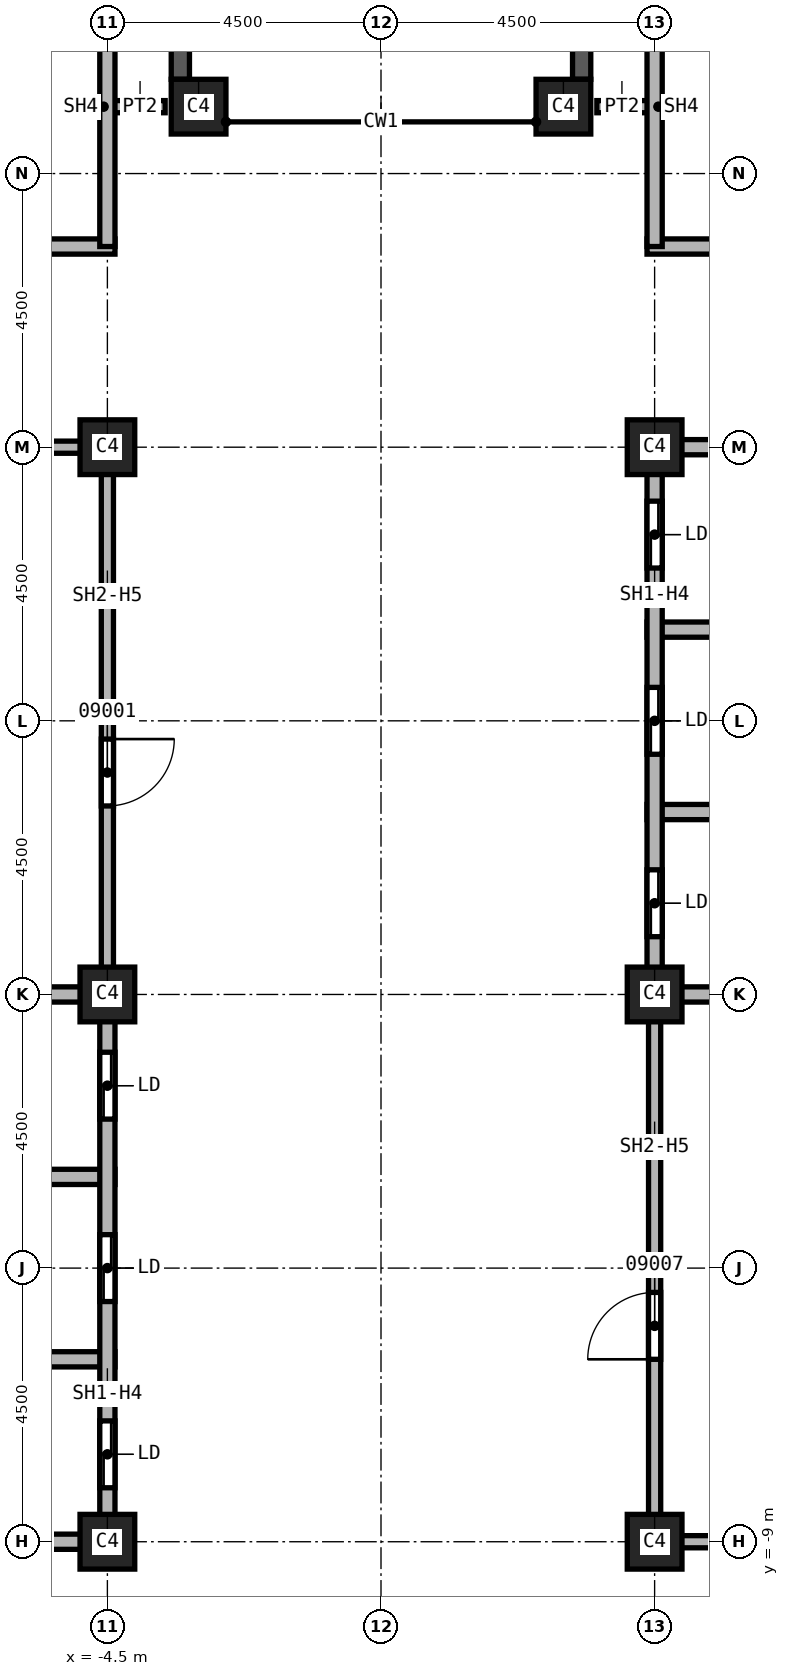
"""IFC4 building model, lengths in metres.
Left out: names, types, materials, properties, quantities, classifications, styles, units other than length and angle.
Written with IfcOpenShell. Run it as: python <this file> out.ifc"""

import sys

from ifc_helpers import new_model, si_unit, direction, frame, frame_2d, origin, origin_2d, place, context, subcontext, project, spatial, rectangle, extrude, element, fill, save


model = new_model("IFC4")
c1 = context("Model", 3, precision=1e-05, world=origin(), true_north=direction((0.0, 1.0)))
c2 = subcontext(c1, "Body", "Model", "MODEL_VIEW")
j1 = project(units=[si_unit("LENGTHUNIT", "METRE"), si_unit("PLANEANGLEUNIT", "RADIAN")], contexts=[c1])
p1 = place(None, origin())
s1 = spatial("IfcSite", under=j1, at=p1, CompositionType="ELEMENT")
p2 = place(p1, origin())
s2 = spatial("IfcBuilding", under=s1, at=p2, CompositionType="ELEMENT")
p3 = place(p2, frame((0.0, 0.0, 162.0)))
s3 = spatial("IfcBuildingStorey", under=s2, at=p3, CompositionType="ELEMENT", Elevation=162.0)
for number, where, z_axis, x_axis in (
    (1, (4.5, 0.0, 0.0), (0.0, 0.0, 1.0), (1.0, 0.0, 0.0)),
    (2, (4.5, 9.0, 0.0), (0.0, 0.0, 1.0), (1.0, 0.0, 0.0)),
    (3, (4.5, -9.0, 0.0), (0.0, 0.0, 1.0), (1.0, 0.0, 0.0)),
    (4, (-4.5, 0.0, 0.0), (0.0, 0.0, 1.0), (1.0, 0.0, 0.0)),
    (5, (-4.5, 9.0, 0.0), (0.0, 0.0, 1.0), (1.0, 0.0, 0.0)),
    (6, (-4.5, -9.0, 0.0), (0.0, 0.0, 1.0), (1.0, 0.0, 0.0)),
    (7, (3.0, 14.6, 0.0), (0.0, 0.0, 1.0), (1.0, 0.0, 0.0)),
    (8, (-3.0, 14.6, 0.0), (0.0, 0.0, 1.0), (1.0, 0.0, 0.0)),
):
    element("IfcColumn", number, at=place(p3, frame(where, z_axis=z_axis, x_axis=x_axis)), inside=s3, PredefinedType="COLUMN", context=c2, shape_type="SweptSolid", body=[
        extrude(rectangle(XDim=0.9, YDim=0.9, at=origin_2d()), origin(), (0.0, 0.0, 1.0), 3.7),
    ])
p4 = place(p3, frame((3.3, 23.05, 0.0), z_axis=(0.0, 0.0, 1.0), x_axis=(0.0, -1.0, 0.0)))
e9 = element("IfcWall", 9, at=p4, inside=s3, PredefinedType="SOLIDWALL", context=c2, shape_type="SweptSolid", body=[
    extrude(rectangle(XDim=8.0, YDim=0.3, at=frame_2d((4.0, 0.0))), origin(), (0.0, 0.0, 1.0), 3.1),
])
p5 = place(p4, frame((0.8, 0.0, 0.8)))
e10 = element("IfcOpeningElement", 10, at=p5, cuts=e9, PredefinedType="OPENING", context=c2, shape_type="SweptSolid", body=[
    extrude(rectangle(XDim=2.4, YDim=1.95, at=frame_2d((1.2, 0.975))), frame((0.0, 0.15, 0.0), z_axis=(0.0, -1.0, 0.0), x_axis=(1.0, 0.0, 0.0)), (0.0, 0.0, 1.0), 0.3),
])
p6 = place(p4, frame((4.8, 0.0, 0.8)))
e11 = element("IfcOpeningElement", 11, at=p6, cuts=e9, PredefinedType="OPENING", context=c2, shape_type="SweptSolid", body=[
    extrude(rectangle(XDim=2.4, YDim=1.95, at=frame_2d((1.2, 0.975))), frame((0.0, 0.15, 0.0), z_axis=(0.0, -1.0, 0.0), x_axis=(1.0, 0.0, 0.0)), (0.0, 0.0, 1.0), 0.3),
])
p7 = place(p3, frame((-3.3, 15.05, 0.0), z_axis=(0.0, 0.0, 1.0), x_axis=(0.0, 1.0, 0.0)))
e12 = element("IfcWall", 12, at=p7, inside=s3, PredefinedType="SOLIDWALL", context=c2, shape_type="SweptSolid", body=[
    extrude(rectangle(XDim=8.0, YDim=0.3, at=frame_2d((4.0, 0.0))), origin(), (0.0, 0.0, 1.0), 3.1),
])
p8 = place(p7, frame((0.8, 0.0, 0.8)))
e13 = element("IfcOpeningElement", 13, at=p8, cuts=e12, PredefinedType="OPENING", context=c2, shape_type="SweptSolid", body=[
    extrude(rectangle(XDim=2.4, YDim=1.95, at=frame_2d((1.2, 0.975))), frame((0.0, 0.15, 0.0), z_axis=(0.0, -1.0, 0.0), x_axis=(1.0, 0.0, 0.0)), (0.0, 0.0, 1.0), 0.3),
])
p9 = place(p7, frame((4.8, 0.0, 0.8)))
e14 = element("IfcOpeningElement", 14, at=p9, cuts=e12, PredefinedType="OPENING", context=c2, shape_type="SweptSolid", body=[
    extrude(rectangle(XDim=2.4, YDim=1.95, at=frame_2d((1.2, 0.975))), frame((0.0, 0.15, 0.0), z_axis=(0.0, -1.0, 0.0), x_axis=(1.0, 0.0, 0.0)), (0.0, 0.0, 1.0), 0.3),
])
for number, where, z_axis, x_axis in (
    (15, (-4.5, 14.6, 0.0), (0.0, 0.0, 1.0), (1.0, 0.0, 0.0)),
    (16, (3.55, 14.6, 0.0), (0.0, 0.0, 1.0), (1.0, 0.0, 0.0)),
):
    element("IfcWall", number, at=place(p3, frame(where, z_axis=z_axis, x_axis=x_axis)), inside=s3, PredefinedType="PARTITIONING", context=c2, shape_type="SweptSolid", body=[
        extrude(rectangle(XDim=0.95, YDim=0.2, at=frame_2d((0.475, 0.0))), origin(), (0.0, 0.0, 1.0), 3.7),
    ])
p10 = place(p3, frame((-7.5, 9.0, 0.0), z_axis=(0.0, 0.0, 1.0), x_axis=(1.0, 0.0, 0.0)))
e17 = element("IfcWall", 17, at=p10, inside=s3, PredefinedType="SOLIDWALL", context=c2, shape_type="SweptSolid", body=[
    extrude(rectangle(XDim=3.0, YDim=0.2, at=frame_2d((1.5, 0.0))), origin(), (0.0, 0.0, 1.0), 2.938),
])
p11 = place(p3, frame((-4.5, 9.1, 0.0), z_axis=(0.0, 0.0, 1.0), x_axis=(0.0, -1.0, 0.0)))
e18 = element("IfcWall", 18, at=p11, inside=s3, PredefinedType="SOLIDWALL", context=c2, shape_type="SweptSolid", body=[
    extrude(rectangle(XDim=9.1, YDim=0.2, at=frame_2d((4.55, 0.0))), origin(), (0.0, 0.0, 1.0), 2.938),
])
p12 = place(p11, frame((4.9, 0.0, 0.0)))
e19 = element("IfcOpeningElement", 19, at=p12, cuts=e18, PredefinedType="OPENING", context=c2, shape_type="SweptSolid", body=[
    extrude(rectangle(XDim=1.1, YDim=2.1, at=frame_2d((0.55, 1.05))), frame((0.0, 0.1, 0.0), z_axis=(0.0, -1.0, 0.0), x_axis=(1.0, 0.0, 0.0)), (0.0, 0.0, 1.0), 0.2),
])
p13 = place(p3, frame((4.5, -9.1, 0.0), z_axis=(0.0, 0.0, 1.0), x_axis=(0.0, 1.0, 0.0)))
e20 = element("IfcWall", 20, at=p13, inside=s3, PredefinedType="SOLIDWALL", context=c2, shape_type="SweptSolid", body=[
    extrude(rectangle(XDim=9.1, YDim=0.2, at=frame_2d((4.55, 0.0))), origin(), (0.0, 0.0, 1.0), 2.938),
])
p14 = place(p13, frame((3.1, 0.0, 0.0)))
e21 = element("IfcOpeningElement", 21, at=p14, cuts=e20, PredefinedType="OPENING", context=c2, shape_type="SweptSolid", body=[
    extrude(rectangle(XDim=1.1, YDim=2.1, at=frame_2d((0.55, 1.05))), frame((0.0, 0.1, 0.0), z_axis=(0.0, -1.0, 0.0), x_axis=(1.0, 0.0, 0.0)), (0.0, 0.0, 1.0), 0.2),
])
p15 = place(p3, frame((7.5, -9.0, 0.0), z_axis=(0.0, 0.0, 1.0), x_axis=(-1.0, 0.0, 0.0)))
e22 = element("IfcWall", 22, at=p15, inside=s3, PredefinedType="SOLIDWALL", context=c2, shape_type="SweptSolid", body=[
    extrude(rectangle(XDim=3.0, YDim=0.2, at=frame_2d((1.5, 0.0))), origin(), (0.0, 0.0, 1.0), 2.938),
])
p16 = place(p3, frame((-13.625, -3.0, 0.0), z_axis=(0.0, 0.0, 1.0), x_axis=(1.0, 0.0, 0.0)))
e23 = element("IfcWall", 23, at=p16, inside=s3, PredefinedType="SOLIDWALL", context=c2, shape_type="SweptSolid", body=[
    extrude(rectangle(XDim=9.25, YDim=0.25, at=frame_2d((4.625, 0.0))), origin(), (0.0, 0.0, 1.0), 3.7),
])
p17 = place(p16, frame((3.25, 0.0, 0.0)))
e24 = element("IfcOpeningElement", 24, at=p17, cuts=e23, PredefinedType="OPENING", context=c2, shape_type="SweptSolid", body=[
    extrude(rectangle(XDim=1.1, YDim=2.1, at=frame_2d((0.55, 1.05))), frame((0.0, 0.125, 0.0), z_axis=(0.0, -1.0, 0.0), x_axis=(1.0, 0.0, 0.0)), (0.0, 0.0, 1.0), 0.25),
])
for number, where, z_axis, x_axis in (
    (25, (-7.625, -6.0, 0.0), (0.0, 0.0, 1.0), (1.0, 0.0, 0.0)),
    (26, (-7.625, 0.0, 0.0), (0.0, 0.0, 1.0), (1.0, 0.0, 0.0)),
):
    element("IfcWall", number, at=place(p3, frame(where, z_axis=z_axis, x_axis=x_axis)), inside=s3, PredefinedType="SOLIDWALL", context=c2, shape_type="SweptSolid", body=[
        extrude(rectangle(XDim=3.25, YDim=0.25, at=frame_2d((1.625, 0.0))), origin(), (0.0, 0.0, 1.0), 3.7),
    ])
p18 = place(p3, frame((-4.5, -9.0, 0.0), z_axis=(0.0, 0.0, 1.0), x_axis=(-1.0, 0.0, 0.0)))
e27 = element("IfcWall", 27, at=p18, inside=s3, PredefinedType="SOLIDWALL", context=c2, shape_type="SweptSolid", body=[
    extrude(rectangle(XDim=3.0, YDim=0.25, at=frame_2d((1.5, 0.0))), origin(), (0.0, 0.0, 1.0), 2.938),
])
p19 = place(p3, frame((-4.5, 0.0, 0.0), z_axis=(0.0, 0.0, 1.0), x_axis=(0.0, -1.0, 0.0)))
e28 = element("IfcWall", 28, at=p19, inside=s3, PredefinedType="SOLIDWALL", context=c2, shape_type="SweptSolid", body=[
    extrude(rectangle(XDim=9.125, YDim=0.25, at=frame_2d((4.562, 0.0))), origin(), (0.0, 0.0, 1.0), 2.938),
])
p20 = place(p19, frame((7.012, 0.0, 0.0)))
e29 = element("IfcOpeningElement", 29, at=p20, cuts=e28, PredefinedType="OPENING", context=c2, shape_type="SweptSolid", body=[
    extrude(rectangle(XDim=1.1, YDim=2.1, at=frame_2d((0.55, 1.05))), frame((0.0, 0.125, 0.0), z_axis=(0.0, -1.0, 0.0), x_axis=(1.0, 0.0, 0.0)), (0.0, 0.0, 1.0), 0.25),
])
p21 = place(p19, frame((3.95, 0.0, 0.0)))
e30 = element("IfcOpeningElement", 30, at=p21, cuts=e28, PredefinedType="OPENING", context=c2, shape_type="SweptSolid", body=[
    extrude(rectangle(XDim=1.1, YDim=2.1, at=frame_2d((0.55, 1.05))), frame((0.0, 0.125, 0.0), z_axis=(0.0, -1.0, 0.0), x_axis=(1.0, 0.0, 0.0)), (0.0, 0.0, 1.0), 0.25),
])
p22 = place(p19, frame((0.95, 0.0, 0.0)))
e31 = element("IfcOpeningElement", 31, at=p22, cuts=e28, PredefinedType="OPENING", context=c2, shape_type="SweptSolid", body=[
    extrude(rectangle(XDim=1.1, YDim=2.1, at=frame_2d((0.55, 1.05))), frame((0.0, 0.125, 0.0), z_axis=(0.0, -1.0, 0.0), x_axis=(1.0, 0.0, 0.0)), (0.0, 0.0, 1.0), 0.25),
])
p23 = place(p3, frame((4.375, 0.0, 0.0), z_axis=(0.0, 0.0, 1.0), x_axis=(1.0, 0.0, 0.0)))
e32 = element("IfcWall", 32, at=p23, inside=s3, PredefinedType="SOLIDWALL", context=c2, shape_type="SweptSolid", body=[
    extrude(rectangle(XDim=3.25, YDim=0.25, at=frame_2d((1.625, 0.0))), origin(), (0.0, 0.0, 1.0), 3.7),
])
p24 = place(p3, frame((4.375, 3.0, 0.0), z_axis=(0.0, 0.0, 1.0), x_axis=(1.0, 0.0, 0.0)))
e33 = element("IfcWall", 33, at=p24, inside=s3, PredefinedType="SOLIDWALL", context=c2, shape_type="SweptSolid", body=[
    extrude(rectangle(XDim=9.25, YDim=0.25, at=frame_2d((4.625, 0.0))), origin(), (0.0, 0.0, 1.0), 3.7),
])
p25 = place(p24, frame((4.875, 0.0, 0.0)))
e34 = element("IfcOpeningElement", 34, at=p25, cuts=e33, PredefinedType="OPENING", context=c2, shape_type="SweptSolid", body=[
    extrude(rectangle(XDim=1.1, YDim=2.1, at=frame_2d((0.55, 1.05))), frame((0.0, 0.125, 0.0), z_axis=(0.0, -1.0, 0.0), x_axis=(1.0, 0.0, 0.0)), (0.0, 0.0, 1.0), 0.25),
])
p26 = place(p3, frame((4.375, 6.0, 0.0), z_axis=(0.0, 0.0, 1.0), x_axis=(1.0, 0.0, 0.0)))
e35 = element("IfcWall", 35, at=p26, inside=s3, PredefinedType="SOLIDWALL", context=c2, shape_type="SweptSolid", body=[
    extrude(rectangle(XDim=3.25, YDim=0.25, at=frame_2d((1.625, 0.0))), origin(), (0.0, 0.0, 1.0), 3.7),
])
p27 = place(p3, frame((4.5, 0.0, 0.0), z_axis=(0.0, 0.0, 1.0), x_axis=(0.0, 1.0, 0.0)))
e36 = element("IfcWall", 36, at=p27, inside=s3, PredefinedType="SOLIDWALL", context=c2, shape_type="SweptSolid", body=[
    extrude(rectangle(XDim=9.125, YDim=0.25, at=frame_2d((4.562, 0.0))), origin(), (0.0, 0.0, 1.0), 2.938),
])
p28 = place(p27, frame((0.95, 0.0, 0.0)))
e37 = element("IfcOpeningElement", 37, at=p28, cuts=e36, PredefinedType="OPENING", context=c2, shape_type="SweptSolid", body=[
    extrude(rectangle(XDim=1.1, YDim=2.1, at=frame_2d((0.55, 1.05))), frame((0.0, 0.125, 0.0), z_axis=(0.0, -1.0, 0.0), x_axis=(1.0, 0.0, 0.0)), (0.0, 0.0, 1.0), 0.25),
])
p29 = place(p27, frame((3.95, 0.0, 0.0)))
e38 = element("IfcOpeningElement", 38, at=p29, cuts=e36, PredefinedType="OPENING", context=c2, shape_type="SweptSolid", body=[
    extrude(rectangle(XDim=1.1, YDim=2.1, at=frame_2d((0.55, 1.05))), frame((0.0, 0.125, 0.0), z_axis=(0.0, -1.0, 0.0), x_axis=(1.0, 0.0, 0.0)), (0.0, 0.0, 1.0), 0.25),
])
p30 = place(p27, frame((7.012, 0.0, 0.0)))
e39 = element("IfcOpeningElement", 39, at=p30, cuts=e36, PredefinedType="OPENING", context=c2, shape_type="SweptSolid", body=[
    extrude(rectangle(XDim=1.1, YDim=2.1, at=frame_2d((0.55, 1.05))), frame((0.0, 0.125, 0.0), z_axis=(0.0, -1.0, 0.0), x_axis=(1.0, 0.0, 0.0)), (0.0, 0.0, 1.0), 0.25),
])
p31 = place(p3, frame((4.5, 9.0, 0.0), z_axis=(0.0, 0.0, 1.0), x_axis=(1.0, 0.0, 0.0)))
e40 = element("IfcWall", 40, at=p31, inside=s3, PredefinedType="SOLIDWALL", context=c2, shape_type="SweptSolid", body=[
    extrude(rectangle(XDim=3.0, YDim=0.25, at=frame_2d((1.5, 0.0))), origin(), (0.0, 0.0, 1.0), 2.938),
])
p32 = place(p3, frame((-13.5, 12.3, 0.0), z_axis=(0.0, 0.0, 1.0), x_axis=(1.0, 0.0, 0.0)))
e41 = element("IfcWall", 41, at=p32, inside=s3, PredefinedType="SOLIDWALL", context=c2, shape_type="SweptSolid", body=[
    extrude(rectangle(XDim=9.125, YDim=0.25, at=frame_2d((4.562, 0.0))), origin(), (0.0, 0.0, 1.0), 3.7),
])
p33 = place(p32, frame((0.6, 0.0, 0.0)))
e42 = element("IfcOpeningElement", 42, at=p33, cuts=e41, PredefinedType="OPENING", context=c2, shape_type="SweptSolid", body=[
    extrude(rectangle(XDim=1.2, YDim=2.1, at=frame_2d((0.6, 1.05))), frame((0.0, 0.125, 0.0), z_axis=(0.0, -1.0, 0.0), x_axis=(1.0, 0.0, 0.0)), (0.0, 0.0, 1.0), 0.25),
])
p34 = place(p3, frame((-4.5, 16.8, 0.0), z_axis=(0.0, 0.0, 1.0), x_axis=(0.0, -1.0, 0.0)))
e43 = element("IfcWall", 43, at=p34, inside=s3, PredefinedType="SOLIDWALL", context=c2, shape_type="SweptSolid", body=[
    extrude(rectangle(XDim=4.5, YDim=0.25, at=frame_2d((2.25, 0.0))), origin(), (0.0, 0.0, 1.0), 3.7),
])
p35 = place(p3, frame((4.375, 12.3, 0.0), z_axis=(0.0, 0.0, 1.0), x_axis=(1.0, 0.0, 0.0)))
e44 = element("IfcWall", 44, at=p35, inside=s3, PredefinedType="SOLIDWALL", context=c2, shape_type="SweptSolid", body=[
    extrude(rectangle(XDim=9.125, YDim=0.25, at=frame_2d((4.562, 0.0))), origin(), (0.0, 0.0, 1.0), 3.7),
])
p36 = place(p35, frame((7.2, 0.0, 0.0)))
e45 = element("IfcOpeningElement", 45, at=p36, cuts=e44, PredefinedType="OPENING", context=c2, shape_type="SweptSolid", body=[
    extrude(rectangle(XDim=1.2, YDim=2.1, at=frame_2d((0.6, 1.05))), frame((0.0, 0.125, 0.0), z_axis=(0.0, -1.0, 0.0), x_axis=(1.0, 0.0, 0.0)), (0.0, 0.0, 1.0), 0.25),
])
p37 = place(p3, frame((4.5, 12.3, 0.0), z_axis=(0.0, 0.0, 1.0), x_axis=(0.0, 1.0, 0.0)))
e46 = element("IfcWall", 46, at=p37, inside=s3, PredefinedType="SOLIDWALL", context=c2, shape_type="SweptSolid", body=[
    extrude(rectangle(XDim=4.5, YDim=0.25, at=frame_2d((2.25, 0.0))), origin(), (0.0, 0.0, 1.0), 3.7),
])
p38 = place(p12, origin())
e47 = element("IfcDoor", 47, at=p38, inside=s3, OperationType="SINGLE_SWING_RIGHT", PredefinedType="DOOR", context=c2, shape_type="SweptSolid", body=[
    extrude(rectangle(XDim=1.1, YDim=2.1, at=frame_2d((0.55, 1.05))), frame((0.0, 0.025, 0.0), z_axis=(0.0, -1.0, 0.0), x_axis=(1.0, 0.0, 0.0)), (0.0, 0.0, 1.0), 0.05),
])
fill(e19, e47)
p39 = place(p14, origin())
e48 = element("IfcDoor", 48, at=p39, inside=s3, OperationType="SINGLE_SWING_RIGHT", PredefinedType="DOOR", context=c2, shape_type="SweptSolid", body=[
    extrude(rectangle(XDim=1.1, YDim=2.1, at=frame_2d((0.55, 1.05))), frame((0.0, 0.025, 0.0), z_axis=(0.0, -1.0, 0.0), x_axis=(1.0, 0.0, 0.0)), (0.0, 0.0, 1.0), 0.05),
])
fill(e21, e48)
p40 = place(p20, origin())
e49 = element("IfcDoor", 49, at=p40, inside=s3, OperationType="SLIDING_TO_LEFT", PredefinedType="DOOR", context=c2, shape_type="SweptSolid", body=[
    extrude(rectangle(XDim=1.1, YDim=2.1, at=frame_2d((0.55, 1.05))), frame((0.0, 0.025, 0.0), z_axis=(0.0, -1.0, 0.0), x_axis=(1.0, 0.0, 0.0)), (0.0, 0.0, 1.0), 0.05),
])
fill(e29, e49)
p41 = place(p21, origin())
e50 = element("IfcDoor", 50, at=p41, inside=s3, OperationType="SLIDING_TO_LEFT", PredefinedType="DOOR", context=c2, shape_type="SweptSolid", body=[
    extrude(rectangle(XDim=1.1, YDim=2.1, at=frame_2d((0.55, 1.05))), frame((0.0, 0.025, 0.0), z_axis=(0.0, -1.0, 0.0), x_axis=(1.0, 0.0, 0.0)), (0.0, 0.0, 1.0), 0.05),
])
fill(e30, e50)
p42 = place(p22, origin())
e51 = element("IfcDoor", 51, at=p42, inside=s3, OperationType="SLIDING_TO_LEFT", PredefinedType="DOOR", context=c2, shape_type="SweptSolid", body=[
    extrude(rectangle(XDim=1.1, YDim=2.1, at=frame_2d((0.55, 1.05))), frame((0.0, 0.025, 0.0), z_axis=(0.0, -1.0, 0.0), x_axis=(1.0, 0.0, 0.0)), (0.0, 0.0, 1.0), 0.05),
])
fill(e31, e51)
p43 = place(p28, origin())
e52 = element("IfcDoor", 52, at=p43, inside=s3, OperationType="SLIDING_TO_LEFT", PredefinedType="DOOR", context=c2, shape_type="SweptSolid", body=[
    extrude(rectangle(XDim=1.1, YDim=2.1, at=frame_2d((0.55, 1.05))), frame((0.0, 0.025, 0.0), z_axis=(0.0, -1.0, 0.0), x_axis=(1.0, 0.0, 0.0)), (0.0, 0.0, 1.0), 0.05),
])
fill(e37, e52)
p44 = place(p29, origin())
e53 = element("IfcDoor", 53, at=p44, inside=s3, OperationType="SLIDING_TO_LEFT", PredefinedType="DOOR", context=c2, shape_type="SweptSolid", body=[
    extrude(rectangle(XDim=1.1, YDim=2.1, at=frame_2d((0.55, 1.05))), frame((0.0, 0.025, 0.0), z_axis=(0.0, -1.0, 0.0), x_axis=(1.0, 0.0, 0.0)), (0.0, 0.0, 1.0), 0.05),
])
fill(e38, e53)
p45 = place(p30, origin())
e54 = element("IfcDoor", 54, at=p45, inside=s3, OperationType="SLIDING_TO_LEFT", PredefinedType="DOOR", context=c2, shape_type="SweptSolid", body=[
    extrude(rectangle(XDim=1.1, YDim=2.1, at=frame_2d((0.55, 1.05))), frame((0.0, 0.025, 0.0), z_axis=(0.0, -1.0, 0.0), x_axis=(1.0, 0.0, 0.0)), (0.0, 0.0, 1.0), 0.05),
])
fill(e39, e54)
save(model, sys.argv[1])
